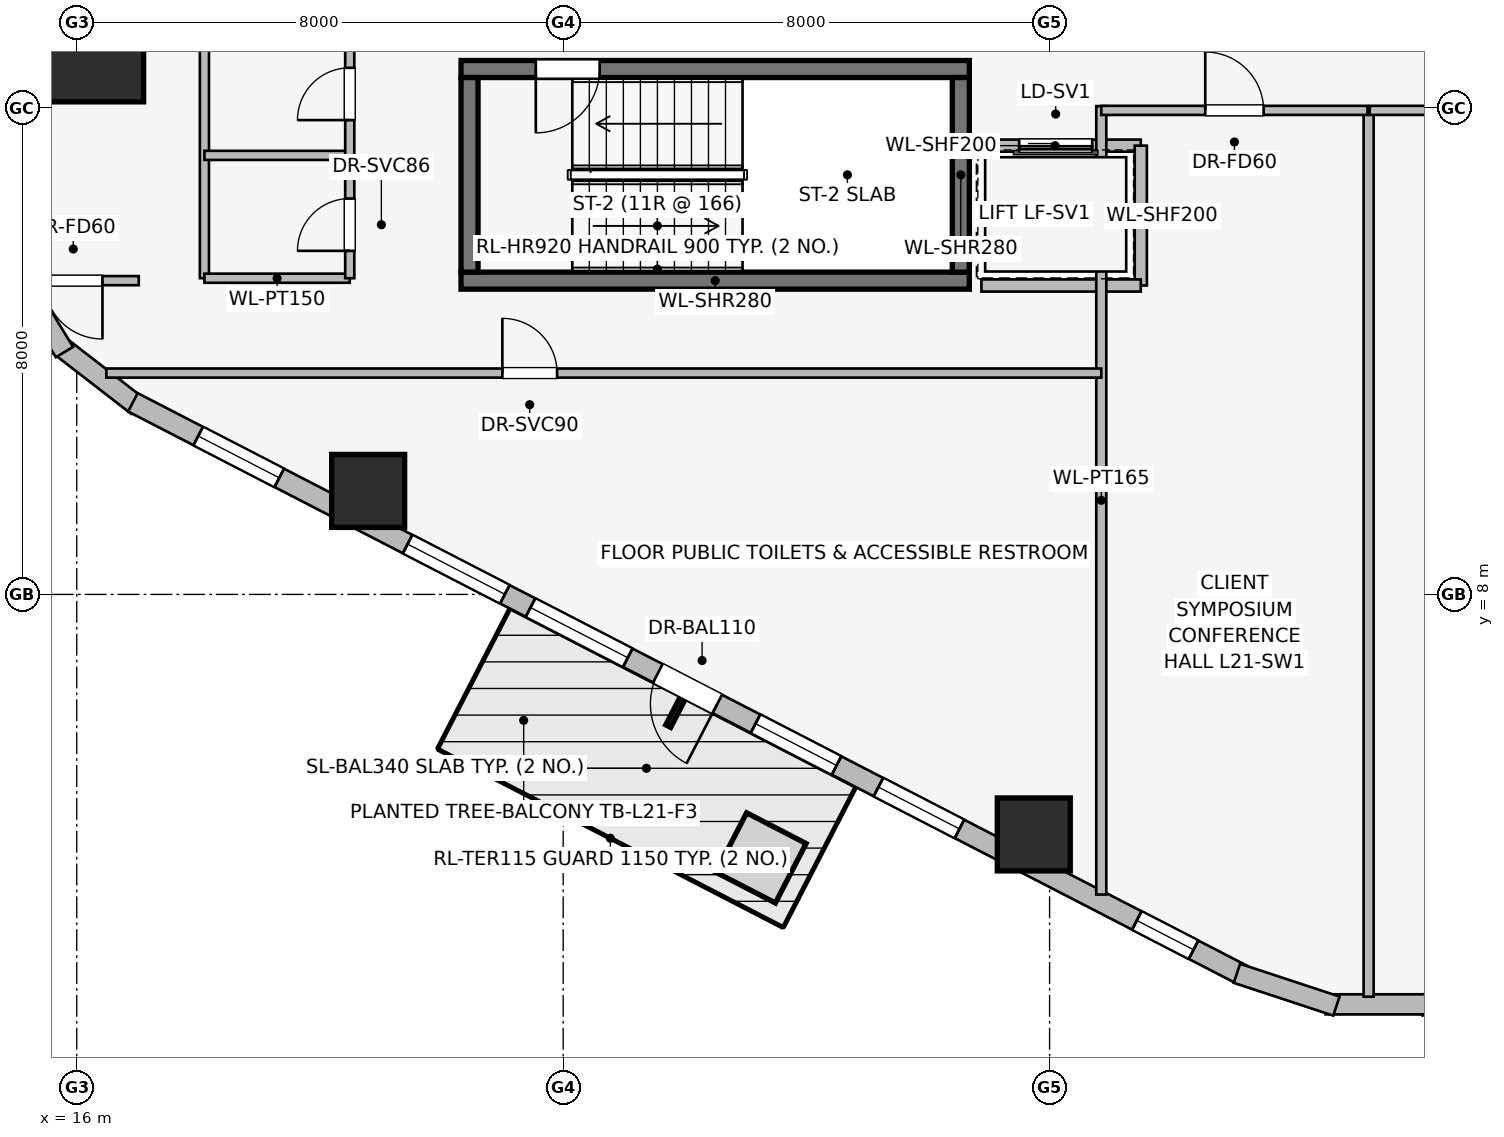
"""IFC4 building model, lengths in metres.
Left out: names, types, materials, properties, quantities, classifications, styles, units other than length and angle.
Written with IfcOpenShell. Run it as: python <this file> out.ifc"""

import sys

from ifc_helpers import new_model, si_unit, direction, frame, frame_2d, origin, origin_2d, place, context, subcontext, project, spatial, rectangle, extrude, element, fill, save


model = new_model("IFC4")
c1 = context("Model", 3, precision=1e-05, world=origin(), true_north=direction((0.0, 1.0)))
c2 = subcontext(c1, "Body", "Model", "MODEL_VIEW")
j1 = project(units=[si_unit("LENGTHUNIT", "METRE"), si_unit("PLANEANGLEUNIT", "RADIAN")], contexts=[c1])
p1 = place(None, origin())
s1 = spatial("IfcSite", under=j1, at=p1, CompositionType="ELEMENT")
p2 = place(p1, origin())
s2 = spatial("IfcBuilding", under=s1, at=p2, CompositionType="ELEMENT")
p3 = place(p2, frame((0.0, 0.0, 81.75)))
s3 = spatial("IfcBuildingStorey", under=s2, at=p3, CompositionType="ELEMENT", Elevation=81.75)
p4 = place(p3, frame((22.32, 13.16, 0.0), z_axis=(0.0, 0.0, 1.0), x_axis=(1.0, 0.0, 0.0)))
e1 = element("IfcWall", 1, at=p4, inside=s3, PredefinedType="SHEAR", context=c2, shape_type="SweptSolid", body=[
    extrude(rectangle(XDim=8.36, YDim=0.28, at=frame_2d((4.18, 0.0))), origin(), (0.0, 0.0, 1.0), 3.65),
])
p5 = place(p3, frame((30.68, 16.64, 0.0), z_axis=(0.0, 0.0, 1.0), x_axis=(-1.0, 0.0, 0.0)))
e2 = element("IfcWall", 2, at=p5, inside=s3, PredefinedType="SHEAR", context=c2, shape_type="SweptSolid", body=[
    extrude(rectangle(XDim=8.36, YDim=0.28, at=frame_2d((4.18, 0.0))), origin(), (0.0, 0.0, 1.0), 3.65),
])
p6 = place(p5, frame((6.08, 0.0, 0.0)))
e3 = element("IfcOpeningElement", 3, at=p6, cuts=e2, PredefinedType="OPENING", context=c2, shape_type="SweptSolid", body=[
    extrude(rectangle(XDim=1.05, YDim=2.0, at=frame_2d((0.525, 1.0))), frame((0.0, 0.15, 0.0), z_axis=(0.0, -1.0, 0.0), x_axis=(1.0, 0.0, 0.0)), (0.0, 0.0, 1.0), 0.3),
])
for number, where, z_axis, x_axis in (
    (4, (22.46, 16.5, 0.0), (0.0, 0.0, 1.0), (0.0, -1.0, 0.0)),
    (5, (30.54, 13.3, 0.0), (0.0, 0.0, 1.0), (0.0, 1.0, 0.0)),
):
    element("IfcWall", number, at=place(p3, frame(where, z_axis=z_axis, x_axis=x_axis)), inside=s3, PredefinedType="SHEAR", context=c2, shape_type="SweptSolid", body=[
        extrude(rectangle(XDim=3.2, YDim=0.28, at=frame_2d((1.6, 0.0))), origin(), (0.0, 0.0, 1.0), 3.65),
    ])
p7 = place(p3, frame((16.3, 16.9, 0.0), z_axis=(0.0, 0.0, 1.0), x_axis=(1.0, 0.0, 0.0)))
e6 = element("IfcColumn", 6, at=p7, inside=s3, PredefinedType="COLUMN", context=c2, shape_type="SweptSolid", body=[
    extrude(rectangle(XDim=1.6, YDim=1.6, at=origin_2d()), origin(), (0.0, 0.0, 1.0), 3.65),
])
for number, where, z_axis, x_axis in (
    (7, (20.793, 9.702, 0.0), (0.0, 0.0, 1.0), (1.0, 0.0, 0.0)),
    (8, (31.74, 4.053, 0.0), (0.0, 0.0, 1.0), (1.0, 0.0, 0.0)),
):
    element("IfcColumn", number, at=place(p3, frame(where, z_axis=z_axis, x_axis=x_axis)), inside=s3, PredefinedType="COLUMN", context=c2, shape_type="SweptSolid", body=[
        extrude(rectangle(XDim=1.2, YDim=1.2, at=origin_2d()), origin(), (0.0, 0.0, 1.0), 3.65),
    ])
p8 = place(p3, frame((16.998, 11.099, 0.0), z_axis=(0.0, 0.0, 1.0), x_axis=(-0.790691856293, 0.61221433207, 0.0)))
e9 = element("IfcWall", 9, at=p8, inside=s3, PredefinedType="STANDARD", context=c2, shape_type="SweptSolid", body=[
    extrude(rectangle(XDim=1.676, YDim=0.33, at=frame_2d((0.838, 0.0))), origin(), (0.0, 0.0, 1.0), 3.39),
])
p9 = place(p3, frame((15.798, 11.985, 0.0), z_axis=(0.0, 0.0, 1.0), x_axis=(-0.520584129191, 0.853810379671, 0.0)))
e10 = element("IfcWall", 10, at=p9, inside=s3, PredefinedType="STANDARD", context=c2, shape_type="SweptSolid", body=[
    extrude(rectangle(XDim=1.677, YDim=0.33, at=frame_2d((0.838, 0.0))), origin(), (0.0, 0.0, 1.0), 3.39),
])
p10 = place(p3, frame((35.169, 1.743, 0.0), z_axis=(0.0, 0.0, 1.0), x_axis=(-0.888634413993, 0.458616264721, 0.0)))
e11 = element("IfcWall", 11, at=p10, inside=s3, PredefinedType="STANDARD", context=c2, shape_type="SweptSolid", body=[
    extrude(rectangle(XDim=20.531, YDim=0.34, at=frame_2d((10.266, 0.0))), origin(), (0.0, 0.0, 1.0), 2.684),
])
p11 = place(p10, frame((9.716, 0.0, 0.0)))
e12 = element("IfcOpeningElement", 12, at=p11, cuts=e11, PredefinedType="OPENING", context=c2, shape_type="SweptSolid", body=[
    extrude(rectangle(XDim=1.1, YDim=2.04, at=frame_2d((0.55, 1.02))), frame((0.0, 0.18, 0.0), z_axis=(0.0, -1.0, 0.0), x_axis=(1.0, 0.0, 0.0)), (0.0, 0.0, 1.0), 0.36),
])
p12 = place(p10, frame((0.902, 0.0, 0.75)))
e13 = element("IfcOpeningElement", 13, at=p12, cuts=e11, PredefinedType="OPENING", context=c2, shape_type="SweptSolid", body=[
    extrude(rectangle(XDim=1.05, YDim=1.4, at=frame_2d((0.525, 0.7))), frame((0.0, 0.18, 0.0), z_axis=(0.0, -1.0, 0.0), x_axis=(1.0, 0.0, 0.0)), (0.0, 0.0, 1.0), 0.36),
])
p13 = place(p10, frame((5.234, 0.0, 0.75)))
e14 = element("IfcOpeningElement", 14, at=p13, cuts=e11, PredefinedType="OPENING", context=c2, shape_type="SweptSolid", body=[
    extrude(rectangle(XDim=1.5, YDim=1.5, at=frame_2d((0.75, 0.75))), frame((0.0, 0.18, 0.0), z_axis=(0.0, -1.0, 0.0), x_axis=(1.0, 0.0, 0.0)), (0.0, 0.0, 1.0), 0.36),
])
p14 = place(p10, frame((7.509, 0.0, 0.75)))
e15 = element("IfcOpeningElement", 15, at=p14, cuts=e11, PredefinedType="OPENING", context=c2, shape_type="SweptSolid", body=[
    extrude(rectangle(XDim=1.5, YDim=1.5, at=frame_2d((0.75, 0.75))), frame((0.0, 0.18, 0.0), z_axis=(0.0, -1.0, 0.0), x_axis=(1.0, 0.0, 0.0)), (0.0, 0.0, 1.0), 0.36),
])
p15 = place(p10, frame((11.373, 0.0, 0.75)))
e16 = element("IfcOpeningElement", 16, at=p15, cuts=e11, PredefinedType="OPENING", context=c2, shape_type="SweptSolid", body=[
    extrude(rectangle(XDim=1.8, YDim=1.5, at=frame_2d((0.9, 0.75))), frame((0.0, 0.18, 0.0), z_axis=(0.0, -1.0, 0.0), x_axis=(1.0, 0.0, 0.0)), (0.0, 0.0, 1.0), 0.36),
])
p16 = place(p10, frame((13.648, 0.0, 0.75)))
e17 = element("IfcOpeningElement", 17, at=p16, cuts=e11, PredefinedType="OPENING", context=c2, shape_type="SweptSolid", body=[
    extrude(rectangle(XDim=1.8, YDim=1.5, at=frame_2d((0.9, 0.75))), frame((0.0, 0.18, 0.0), z_axis=(0.0, -1.0, 0.0), x_axis=(1.0, 0.0, 0.0)), (0.0, 0.0, 1.0), 0.36),
])
p17 = place(p10, frame((17.823, 0.0, 0.75)))
e18 = element("IfcOpeningElement", 18, at=p17, cuts=e11, PredefinedType="OPENING", context=c2, shape_type="SweptSolid", body=[
    extrude(rectangle(XDim=1.5, YDim=1.5, at=frame_2d((0.75, 0.75))), frame((0.0, 0.18, 0.0), z_axis=(0.0, -1.0, 0.0), x_axis=(1.0, 0.0, 0.0)), (0.0, 0.0, 1.0), 0.36),
])
p18 = place(p3, frame((39.719, 1.769, 0.0), z_axis=(0.0, 0.0, 1.0), x_axis=(-0.94976901097, -0.312951794691, 0.0)))
e19 = element("IfcWall", 19, at=p18, inside=s3, PredefinedType="STANDARD", context=c2, shape_type="SweptSolid", body=[
    extrude(rectangle(XDim=1.722, YDim=0.33, at=frame_2d((0.861, 0.0))), origin(), (0.0, 0.0, 1.0), 3.39),
])
p19 = place(p3, frame((38.261, 1.259, 0.0), z_axis=(0.0, 0.0, 1.0), x_axis=(-1.0, 0.0, 0.0)))
e20 = element("IfcWall", 20, at=p19, inside=s3, PredefinedType="STANDARD", context=c2, shape_type="SweptSolid", body=[
    extrude(rectangle(XDim=1.722, YDim=0.33, at=frame_2d((0.861, 0.0))), origin(), (0.0, 0.0, 1.0), 3.39),
])
p20 = place(p3, frame((36.717, 1.23, 0.0), z_axis=(0.0, 0.0, 1.0), x_axis=(-0.94976901097, 0.312951794691, 0.0)))
e21 = element("IfcWall", 21, at=p20, inside=s3, PredefinedType="STANDARD", context=c2, shape_type="SweptSolid", body=[
    extrude(rectangle(XDim=1.722, YDim=0.33, at=frame_2d((0.861, 0.0))), origin(), (0.0, 0.0, 1.0), 3.39),
])
p21 = place(p3, frame((33.5, 15.38, 0.0), z_axis=(0.0, 0.0, 1.0), x_axis=(-1.0, 0.0, 0.0)))
e22 = element("IfcWall", 22, at=p21, inside=s3, PredefinedType="PARTITIONING", context=c2, shape_type="SweptSolid", body=[
    extrude(rectangle(XDim=2.82, YDim=0.2, at=frame_2d((1.41, 0.0))), origin(), (0.0, 0.0, 1.0), 3.39),
])
p22 = place(p21, frame((0.8, 0.0, 0.0)))
e23 = element("IfcOpeningElement", 23, at=p22, cuts=e22, PredefinedType="OPENING", context=c2, shape_type="SweptSolid", body=[
    extrude(rectangle(XDim=1.2, YDim=2.2, at=frame_2d((0.6, 1.1))), frame((0.0, 0.11, 0.0), z_axis=(0.0, -1.0, 0.0), x_axis=(1.0, 0.0, 0.0)), (0.0, 0.0, 1.0), 0.22),
])
p23 = place(p3, frame((33.5, 13.08, 0.0), z_axis=(0.0, 0.0, 1.0), x_axis=(0.0, 1.0, 0.0)))
e24 = element("IfcWall", 24, at=p23, inside=s3, PredefinedType="PARTITIONING", context=c2, shape_type="SweptSolid", body=[
    extrude(rectangle(XDim=2.3, YDim=0.2, at=frame_2d((1.15, 0.0))), origin(), (0.0, 0.0, 1.0), 3.39),
])
p24 = place(p3, frame((30.879, 13.08, 0.0), z_axis=(0.0, 0.0, 1.0), x_axis=(1.0, 0.0, 0.0)))
e25 = element("IfcWall", 25, at=p24, inside=s3, PredefinedType="PARTITIONING", context=c2, shape_type="SweptSolid", body=[
    extrude(rectangle(XDim=2.621, YDim=0.2, at=frame_2d((1.311, 0.0))), origin(), (0.0, 0.0, 1.0), 3.39),
])
p25 = place(p3, frame((18.1, 17.34, 0.0), z_axis=(0.0, 0.0, 1.0), x_axis=(0.0, -1.0, 0.0)))
e26 = element("IfcWall", 26, at=p25, inside=s3, PredefinedType="PARTITIONING", context=c2, shape_type="SweptSolid", body=[
    extrude(rectangle(XDim=4.14, YDim=0.15, at=frame_2d((2.07, 0.0))), origin(), (0.0, 0.0, 1.0), 3.39),
])
for number, where, z_axis, x_axis in (
    (27, (18.1, 13.2, 0.0), (0.0, 0.0, 1.0), (1.0, 0.0, 0.0)),
    (28, (18.1, 15.22, 0.0), (0.0, 0.0, 1.0), (1.0, 0.0, 0.0)),
):
    element("IfcWall", number, at=place(p3, frame(where, z_axis=z_axis, x_axis=x_axis)), inside=s3, PredefinedType="PARTITIONING", context=c2, shape_type="SweptSolid", body=[
        extrude(rectangle(XDim=2.39, YDim=0.15, at=frame_2d((1.195, 0.0))), origin(), (0.0, 0.0, 1.0), 3.39),
    ])
p26 = place(p3, frame((20.49, 13.2, 0.0), z_axis=(0.0, 0.0, 1.0), x_axis=(0.0, 1.0, 0.0)))
e29 = element("IfcWall", 29, at=p26, inside=s3, PredefinedType="PARTITIONING", context=c2, shape_type="SweptSolid", body=[
    extrude(rectangle(XDim=4.14, YDim=0.15, at=frame_2d((2.07, 0.0))), origin(), (0.0, 0.0, 1.0), 3.39),
])
p27 = place(p26, frame((0.45, 0.0, 0.0)))
e30 = element("IfcOpeningElement", 30, at=p27, cuts=e29, PredefinedType="OPENING", context=c2, shape_type="SweptSolid", body=[
    extrude(rectangle(XDim=0.86, YDim=2.0, at=frame_2d((0.43, 1.0))), frame((0.0, 0.085, 0.0), z_axis=(0.0, -1.0, 0.0), x_axis=(1.0, 0.0, 0.0)), (0.0, 0.0, 1.0), 0.17),
])
p28 = place(p26, frame((2.6, 0.0, 0.0)))
e31 = element("IfcOpeningElement", 31, at=p28, cuts=e29, PredefinedType="OPENING", context=c2, shape_type="SweptSolid", body=[
    extrude(rectangle(XDim=0.86, YDim=2.0, at=frame_2d((0.43, 1.0))), frame((0.0, 0.085, 0.0), z_axis=(0.0, -1.0, 0.0), x_axis=(1.0, 0.0, 0.0)), (0.0, 0.0, 1.0), 0.17),
])
p29 = place(p3, frame((32.85, 3.064, 0.0), z_axis=(0.0, 0.0, 1.0), x_axis=(0.0, 1.0, 0.0)))
e32 = element("IfcWall", 32, at=p29, inside=s3, PredefinedType="PARTITIONING", context=c2, shape_type="SweptSolid", body=[
    extrude(rectangle(XDim=12.966, YDim=0.165, at=frame_2d((6.483, 0.0))), origin(), (0.0, 0.0, 1.0), 3.39),
])
p30 = place(p3, frame((16.487, 11.64, 0.0), z_axis=(0.0, 0.0, 1.0), x_axis=(1.0, 0.0, 0.0)))
e33 = element("IfcWall", 33, at=p30, inside=s3, PredefinedType="PARTITIONING", context=c2, shape_type="SweptSolid", body=[
    extrude(rectangle(XDim=16.363, YDim=0.15, at=frame_2d((8.182, 0.0))), origin(), (0.0, 0.0, 1.0), 3.39),
])
p31 = place(p30, frame((6.513, 0.0, 0.0)))
e34 = element("IfcOpeningElement", 34, at=p31, cuts=e33, PredefinedType="OPENING", context=c2, shape_type="SweptSolid", body=[
    extrude(rectangle(XDim=0.9, YDim=2.0, at=frame_2d((0.45, 1.0))), frame((0.0, 0.085, 0.0), z_axis=(0.0, -1.0, 0.0), x_axis=(1.0, 0.0, 0.0)), (0.0, 0.0, 1.0), 0.17),
])
p32 = place(p3, frame((17.02, 13.16, 0.0), z_axis=(0.0, 0.0, 1.0), x_axis=(-1.0, 0.0, 0.0)))
e35 = element("IfcWall", 35, at=p32, inside=s3, PredefinedType="PARTITIONING", context=c2, shape_type="SweptSolid", body=[
    extrude(rectangle(XDim=2.12, YDim=0.15, at=frame_2d((1.06, 0.0))), origin(), (0.0, 0.0, 1.0), 3.39),
])
p33 = place(p32, frame((0.597, 0.0, 0.0)))
e36 = element("IfcOpeningElement", 36, at=p33, cuts=e35, PredefinedType="OPENING", context=c2, shape_type="SweptSolid", body=[
    extrude(rectangle(XDim=0.96, YDim=2.0, at=frame_2d((0.48, 1.0))), frame((0.0, 0.085, 0.0), z_axis=(0.0, -1.0, 0.0), x_axis=(1.0, 0.0, 0.0)), (0.0, 0.0, 1.0), 0.17),
])
p34 = place(p3, frame((37.247, 1.384, 0.0), z_axis=(0.0, 0.0, 1.0), x_axis=(0.0, 1.0, 0.0)))
e37 = element("IfcWall", 37, at=p34, inside=s3, PredefinedType="PARTITIONING", context=c2, shape_type="SweptSolid", body=[
    extrude(rectangle(XDim=14.546, YDim=0.165, at=frame_2d((7.273, 0.0))), origin(), (0.0, 0.0, 1.0), 3.39),
])
p35 = place(p3, frame((32.85, 15.96, 0.0), z_axis=(0.0, 0.0, 1.0), x_axis=(1.0, 0.0, 0.0)))
e38 = element("IfcWall", 38, at=p35, inside=s3, PredefinedType="PARTITIONING", context=c2, shape_type="SweptSolid", body=[
    extrude(rectangle(XDim=4.379, YDim=0.15, at=frame_2d((2.189, 0.0))), origin(), (0.0, 0.0, 1.0), 3.39),
])
p36 = place(p35, frame((1.71, 0.0, 0.0)))
e39 = element("IfcOpeningElement", 39, at=p36, cuts=e38, PredefinedType="OPENING", context=c2, shape_type="SweptSolid", body=[
    extrude(rectangle(XDim=0.96, YDim=2.0, at=frame_2d((0.48, 1.0))), frame((0.0, 0.085, 0.0), z_axis=(0.0, -1.0, 0.0), x_axis=(1.0, 0.0, 0.0)), (0.0, 0.0, 1.0), 0.17),
])
p37 = place(p3, frame((37.265, 15.96, 0.0), z_axis=(0.0, 0.0, 1.0), x_axis=(1.0, 0.0, 0.0)))
e40 = element("IfcWall", 40, at=p37, inside=s3, PredefinedType="PARTITIONING", context=c2, shape_type="SweptSolid", body=[
    extrude(rectangle(XDim=4.561, YDim=0.15, at=frame_2d((2.281, 0.0))), origin(), (0.0, 0.0, 1.0), 3.39),
])
p38 = place(p37, frame((1.801, 0.0, 0.0)))
e41 = element("IfcOpeningElement", 41, at=p38, cuts=e40, PredefinedType="OPENING", context=c2, shape_type="SweptSolid", body=[
    extrude(rectangle(XDim=0.96, YDim=2.0, at=frame_2d((0.48, 1.0))), frame((0.0, 0.085, 0.0), z_axis=(0.0, -1.0, 0.0), x_axis=(1.0, 0.0, 0.0)), (0.0, 0.0, 1.0), 0.17),
])
p39 = place(p11, origin())
e42 = element("IfcDoor", 42, at=p39, inside=s3, OperationType="SINGLE_SWING_LEFT", PredefinedType="DOOR", context=c2, shape_type="SweptSolid", body=[
    extrude(rectangle(XDim=1.1, YDim=2.04, at=frame_2d((0.55, 1.02))), frame((0.0, 0.025, 0.0), z_axis=(0.0, -1.0, 0.0), x_axis=(1.0, 0.0, 0.0)), (0.0, 0.0, 1.0), 0.05),
])
fill(e12, e42)
p40 = place(p12, origin())
e43 = element("IfcWindow", 43, at=p40, inside=s3, PartitioningType="SINGLE_PANEL", PredefinedType="WINDOW", context=c2, shape_type="SweptSolid", body=[
    extrude(rectangle(XDim=1.05, YDim=1.4, at=frame_2d((0.525, 0.7))), frame((0.0, 0.03, 0.0), z_axis=(0.0, -1.0, 0.0), x_axis=(1.0, 0.0, 0.0)), (0.0, 0.0, 1.0), 0.06),
])
fill(e13, e43)
p41 = place(p13, origin())
e44 = element("IfcWindow", 44, at=p41, inside=s3, PartitioningType="SINGLE_PANEL", PredefinedType="WINDOW", context=c2, shape_type="SweptSolid", body=[
    extrude(rectangle(XDim=1.5, YDim=1.5, at=frame_2d((0.75, 0.75))), frame((0.0, 0.03, 0.0), z_axis=(0.0, -1.0, 0.0), x_axis=(1.0, 0.0, 0.0)), (0.0, 0.0, 1.0), 0.06),
])
fill(e14, e44)
p42 = place(p14, origin())
e45 = element("IfcWindow", 45, at=p42, inside=s3, PartitioningType="SINGLE_PANEL", PredefinedType="WINDOW", context=c2, shape_type="SweptSolid", body=[
    extrude(rectangle(XDim=1.5, YDim=1.5, at=frame_2d((0.75, 0.75))), frame((0.0, 0.03, 0.0), z_axis=(0.0, -1.0, 0.0), x_axis=(1.0, 0.0, 0.0)), (0.0, 0.0, 1.0), 0.06),
])
fill(e15, e45)
p43 = place(p15, origin())
e46 = element("IfcWindow", 46, at=p43, inside=s3, PartitioningType="SINGLE_PANEL", PredefinedType="WINDOW", context=c2, shape_type="SweptSolid", body=[
    extrude(rectangle(XDim=1.8, YDim=1.5, at=frame_2d((0.9, 0.75))), frame((0.0, 0.03, 0.0), z_axis=(0.0, -1.0, 0.0), x_axis=(1.0, 0.0, 0.0)), (0.0, 0.0, 1.0), 0.06),
])
fill(e16, e46)
p44 = place(p16, origin())
e47 = element("IfcWindow", 47, at=p44, inside=s3, PartitioningType="SINGLE_PANEL", PredefinedType="WINDOW", context=c2, shape_type="SweptSolid", body=[
    extrude(rectangle(XDim=1.8, YDim=1.5, at=frame_2d((0.9, 0.75))), frame((0.0, 0.03, 0.0), z_axis=(0.0, -1.0, 0.0), x_axis=(1.0, 0.0, 0.0)), (0.0, 0.0, 1.0), 0.06),
])
fill(e17, e47)
p45 = place(p17, origin())
e48 = element("IfcWindow", 48, at=p45, inside=s3, PartitioningType="SINGLE_PANEL", PredefinedType="WINDOW", context=c2, shape_type="SweptSolid", body=[
    extrude(rectangle(XDim=1.5, YDim=1.5, at=frame_2d((0.75, 0.75))), frame((0.0, 0.03, 0.0), z_axis=(0.0, -1.0, 0.0), x_axis=(1.0, 0.0, 0.0)), (0.0, 0.0, 1.0), 0.06),
])
fill(e18, e48)
p46 = place(p6, origin())
e49 = element("IfcDoor", 49, at=p46, inside=s3, OperationType="SINGLE_SWING_RIGHT", PredefinedType="DOOR", context=c2, shape_type="SweptSolid", body=[
    extrude(rectangle(XDim=1.05, YDim=2.0, at=frame_2d((0.525, 1.0))), frame((0.0, 0.025, 0.0), z_axis=(0.0, -1.0, 0.0), x_axis=(1.0, 0.0, 0.0)), (0.0, 0.0, 1.0), 0.05),
])
fill(e3, e49)
p47 = place(p22, origin())
e50 = element("IfcDoor", 50, at=p47, inside=s3, OperationType="SLIDING_TO_RIGHT", PredefinedType="DOOR", context=c2, shape_type="SweptSolid", body=[
    extrude(rectangle(XDim=1.2, YDim=2.2, at=frame_2d((0.6, 1.1))), frame((0.0, 0.025, 0.0), z_axis=(0.0, -1.0, 0.0), x_axis=(1.0, 0.0, 0.0)), (0.0, 0.0, 1.0), 0.05),
])
fill(e23, e50)
p48 = place(p27, origin())
e51 = element("IfcDoor", 51, at=p48, inside=s3, OperationType="SINGLE_SWING_LEFT", PredefinedType="DOOR", context=c2, shape_type="SweptSolid", body=[
    extrude(rectangle(XDim=0.86, YDim=2.0, at=frame_2d((0.43, 1.0))), frame((0.0, 0.025, 0.0), z_axis=(0.0, -1.0, 0.0), x_axis=(1.0, 0.0, 0.0)), (0.0, 0.0, 1.0), 0.05),
])
fill(e30, e51)
p49 = place(p28, origin())
e52 = element("IfcDoor", 52, at=p49, inside=s3, OperationType="SINGLE_SWING_LEFT", PredefinedType="DOOR", context=c2, shape_type="SweptSolid", body=[
    extrude(rectangle(XDim=0.86, YDim=2.0, at=frame_2d((0.43, 1.0))), frame((0.0, 0.025, 0.0), z_axis=(0.0, -1.0, 0.0), x_axis=(1.0, 0.0, 0.0)), (0.0, 0.0, 1.0), 0.05),
])
fill(e31, e52)
p50 = place(p31, origin())
e53 = element("IfcDoor", 53, at=p50, inside=s3, OperationType="SINGLE_SWING_LEFT", PredefinedType="DOOR", context=c2, shape_type="SweptSolid", body=[
    extrude(rectangle(XDim=0.9, YDim=2.0, at=frame_2d((0.45, 1.0))), frame((0.0, 0.025, 0.0), z_axis=(0.0, -1.0, 0.0), x_axis=(1.0, 0.0, 0.0)), (0.0, 0.0, 1.0), 0.05),
])
fill(e34, e53)
p51 = place(p33, origin())
e54 = element("IfcDoor", 54, at=p51, inside=s3, OperationType="SINGLE_SWING_LEFT", PredefinedType="DOOR", context=c2, shape_type="SweptSolid", body=[
    extrude(rectangle(XDim=0.96, YDim=2.0, at=frame_2d((0.48, 1.0))), frame((0.0, 0.025, 0.0), z_axis=(0.0, -1.0, 0.0), x_axis=(1.0, 0.0, 0.0)), (0.0, 0.0, 1.0), 0.05),
])
fill(e36, e54)
p52 = place(p36, origin())
e55 = element("IfcDoor", 55, at=p52, inside=s3, OperationType="SINGLE_SWING_LEFT", PredefinedType="DOOR", context=c2, shape_type="SweptSolid", body=[
    extrude(rectangle(XDim=0.96, YDim=2.0, at=frame_2d((0.48, 1.0))), frame((0.0, 0.025, 0.0), z_axis=(0.0, -1.0, 0.0), x_axis=(1.0, 0.0, 0.0)), (0.0, 0.0, 1.0), 0.05),
])
fill(e39, e55)
save(model, sys.argv[1])
